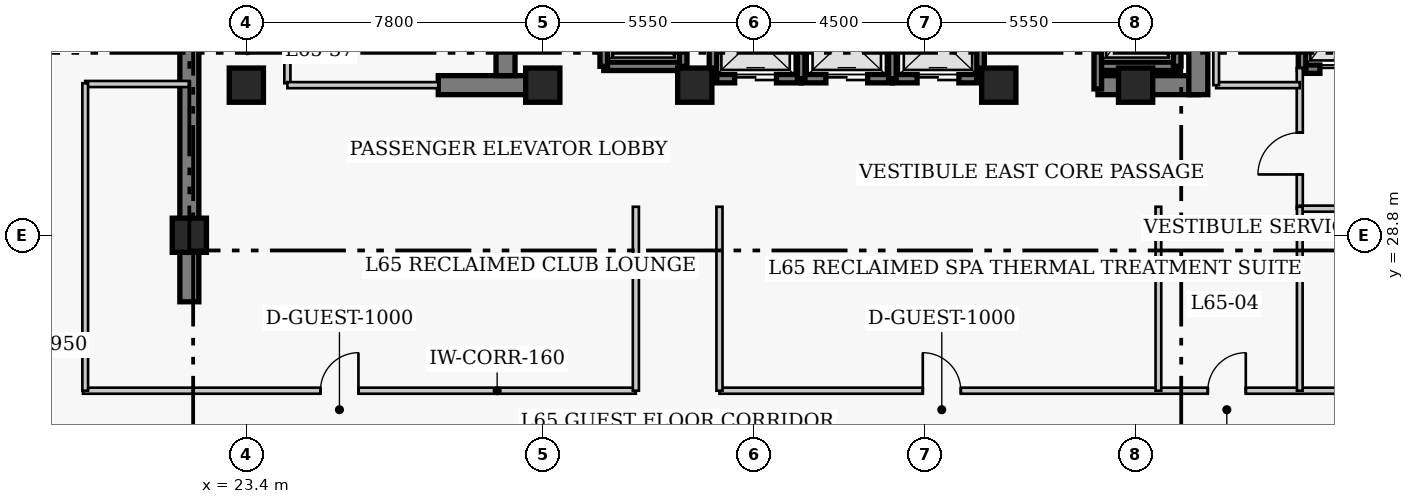
"""IFC4 building model, lengths in metres.
Left out: names, types, materials, properties, quantities, classifications, styles, units other than length and angle.
Written with IfcOpenShell. Run it as: python <this file> out.ifc"""

import sys

from ifc_helpers import new_model, si_unit, direction, frame, frame_2d, origin, origin_2d, place, context, subcontext, project, spatial, rectangle, extrude, element, fill, save


model = new_model("IFC4")
c1 = context("Model", 3, precision=1e-05, world=origin(), true_north=direction((0.0, 1.0)))
c2 = subcontext(c1, "Body", "Model", "MODEL_VIEW")
j1 = project(units=[si_unit("LENGTHUNIT", "METRE"), si_unit("PLANEANGLEUNIT", "RADIAN")], contexts=[c1])
p1 = place(None, origin())
s1 = spatial("IfcSite", under=j1, at=p1, CompositionType="ELEMENT")
p2 = place(p1, origin())
s2 = spatial("IfcBuilding", under=s1, at=p2, CompositionType="ELEMENT")
p3 = place(p2, frame((0.0, 0.0, 261.4)))
s3 = spatial("IfcBuildingStorey", under=s2, at=p3, CompositionType="ELEMENT", Elevation=261.4)
p4 = place(p3, frame((21.9, 27.05, 0.0), z_axis=(0.0, 0.0, 1.0), x_axis=(0.0, 1.0, 0.0)))
e1 = element("IfcWall", 1, at=p4, inside=s3, PredefinedType="SHEAR", context=c2, shape_type="SweptSolid", body=[
    extrude(rectangle(XDim=13.52, YDim=0.5, at=frame_2d((6.76, 0.0))), origin(), (0.0, 0.0, 1.0), 4.0),
])
p5 = place(p3, frame((28.45, 32.75, 0.0), z_axis=(0.0, 0.0, 1.0), x_axis=(1.0, 0.0, 0.0)))
e2 = element("IfcWall", 2, at=p5, inside=s3, PredefinedType="SHEAR", context=c2, shape_type="SweptSolid", body=[
    extrude(rectangle(XDim=2.4, YDim=0.5, at=frame_2d((1.2, 0.0))), origin(), (0.0, 0.0, 1.0), 4.0),
])
p6 = place(p3, frame((45.81, 32.75, 0.0), z_axis=(0.0, 0.0, 1.0), x_axis=(1.0, 0.0, 0.0)))
e3 = element("IfcWall", 3, at=p6, inside=s3, PredefinedType="SHEAR", context=c2, shape_type="SweptSolid", body=[
    extrude(rectangle(XDim=2.64, YDim=0.5, at=frame_2d((1.32, 0.0))), origin(), (0.0, 0.0, 1.0), 4.0),
])
p7 = place(p3, frame((30.22, 33.0, 0.0), z_axis=(0.0, 0.0, 1.0), x_axis=(0.0, 1.0, 0.0)))
e4 = element("IfcWall", 4, at=p7, inside=s3, PredefinedType="SHEAR", context=c2, shape_type="SweptSolid", body=[
    extrude(rectangle(XDim=7.32, YDim=0.5, at=frame_2d((3.66, 0.0))), origin(), (0.0, 0.0, 1.0), 4.0),
])
p8 = place(p3, frame((48.45, 32.5, 0.0), z_axis=(0.0, 0.0, 1.0), x_axis=(0.0, 1.0, 0.0)))
e5 = element("IfcWall", 5, at=p8, inside=s3, PredefinedType="SHEAR", context=c2, shape_type="SweptSolid", body=[
    extrude(rectangle(XDim=7.82, YDim=0.5, at=frame_2d((3.91, 0.0))), origin(), (0.0, 0.0, 1.0), 4.0),
])
p9 = place(p8, frame((5.7, 0.0, 0.0)))
e6 = element("IfcOpeningElement", 6, at=p9, cuts=e5, PredefinedType="OPENING", context=c2, shape_type="SweptSolid", body=[
    extrude(rectangle(XDim=1.1, YDim=2.15, at=frame_2d((0.55, 1.075))), frame((0.0, 0.26, 0.0), z_axis=(0.0, -1.0, 0.0), x_axis=(1.0, 0.0, 0.0)), (0.0, 0.0, 1.0), 0.52),
])
for number, where, z_axis, x_axis in (
    (7, (21.9, 28.8, 0.0), (0.0, 0.0, 1.0), (1.0, 0.0, 0.0)),
    (8, (23.4, 32.75, 0.0), (0.0, 0.0, 1.0), (1.0, 0.0, 0.0)),
    (9, (31.2, 32.75, 0.0), (0.0, 0.0, 1.0), (1.0, 0.0, 0.0)),
    (10, (35.2, 32.75, 0.0), (0.0, 0.0, 1.0), (1.0, 0.0, 0.0)),
    (11, (43.2, 32.75, 0.0), (0.0, 0.0, 1.0), (1.0, 0.0, 0.0)),
    (12, (46.8, 32.75, 0.0), (0.0, 0.0, 1.0), (1.0, 0.0, 0.0)),
):
    element("IfcColumn", number, at=place(p3, frame(where, z_axis=z_axis, x_axis=x_axis)), inside=s3, PredefinedType="COLUMN", context=c2, shape_type="SweptSolid", body=[
        extrude(rectangle(XDim=0.9, YDim=0.9, at=origin_2d()), origin(), (0.0, 0.0, 1.0), 4.0),
    ])
p10 = place(p3, frame((35.68, 32.92, 0.0), z_axis=(0.0, 0.0, 1.0), x_axis=(1.0, 0.0, 0.0)))
e13 = element("IfcWall", 13, at=p10, inside=s3, PredefinedType="SHEAR", context=c2, shape_type="SweptSolid", body=[
    extrude(rectangle(XDim=2.32, YDim=0.22, at=frame_2d((1.16, 0.0))), origin(), (0.0, 0.0, 1.0), 4.0),
])
p11 = place(p10, frame((0.57, 0.0, 0.0)))
e14 = element("IfcOpeningElement", 14, at=p11, cuts=e13, PredefinedType="OPENING", context=c2, shape_type="SweptSolid", body=[
    extrude(rectangle(XDim=1.1, YDim=2.15, at=frame_2d((0.55, 1.075))), frame((0.0, 0.12, 0.0), z_axis=(0.0, -1.0, 0.0), x_axis=(1.0, 0.0, 0.0)), (0.0, 0.0, 1.0), 0.24),
])
p12 = place(p3, frame((35.68, 32.92, 0.0), z_axis=(0.0, 0.0, 1.0), x_axis=(0.0, 1.0, 0.0)))
e15 = element("IfcWall", 15, at=p12, inside=s3, PredefinedType="SHEAR", context=c2, shape_type="SweptSolid", body=[
    extrude(rectangle(XDim=2.16, YDim=0.2, at=frame_2d((1.08, 0.0))), origin(), (0.0, 0.0, 1.0), 4.0),
])
p13 = place(p3, frame((38.0, 32.92, 0.0), z_axis=(0.0, 0.0, 1.0), x_axis=(1.0, 0.0, 0.0)))
e16 = element("IfcWall", 16, at=p13, inside=s3, PredefinedType="SHEAR", context=c2, shape_type="SweptSolid", body=[
    extrude(rectangle(XDim=2.4, YDim=0.22, at=frame_2d((1.2, 0.0))), origin(), (0.0, 0.0, 1.0), 4.0),
])
p14 = place(p13, frame((0.65, 0.0, 0.0)))
e17 = element("IfcOpeningElement", 17, at=p14, cuts=e16, PredefinedType="OPENING", context=c2, shape_type="SweptSolid", body=[
    extrude(rectangle(XDim=1.1, YDim=2.15, at=frame_2d((0.55, 1.075))), frame((0.0, 0.12, 0.0), z_axis=(0.0, -1.0, 0.0), x_axis=(1.0, 0.0, 0.0)), (0.0, 0.0, 1.0), 0.24),
])
p15 = place(p3, frame((38.0, 32.92, 0.0), z_axis=(0.0, 0.0, 1.0), x_axis=(0.0, 1.0, 0.0)))
e18 = element("IfcWall", 18, at=p15, inside=s3, PredefinedType="SHEAR", context=c2, shape_type="SweptSolid", body=[
    extrude(rectangle(XDim=2.16, YDim=0.2, at=frame_2d((1.08, 0.0))), origin(), (0.0, 0.0, 1.0), 4.0),
])
p16 = place(p3, frame((40.4, 32.92, 0.0), z_axis=(0.0, 0.0, 1.0), x_axis=(1.0, 0.0, 0.0)))
e19 = element("IfcWall", 19, at=p16, inside=s3, PredefinedType="SHEAR", context=c2, shape_type="SweptSolid", body=[
    extrude(rectangle(XDim=2.32, YDim=0.22, at=frame_2d((1.16, 0.0))), origin(), (0.0, 0.0, 1.0), 4.0),
])
p17 = place(p16, frame((0.65, 0.0, 0.0)))
e20 = element("IfcOpeningElement", 20, at=p17, cuts=e19, PredefinedType="OPENING", context=c2, shape_type="SweptSolid", body=[
    extrude(rectangle(XDim=1.1, YDim=2.15, at=frame_2d((0.55, 1.075))), frame((0.0, 0.12, 0.0), z_axis=(0.0, -1.0, 0.0), x_axis=(1.0, 0.0, 0.0)), (0.0, 0.0, 1.0), 0.24),
])
for number, where, z_axis, x_axis in (
    (21, (40.4, 32.92, 0.0), (0.0, 0.0, 1.0), (0.0, 1.0, 0.0)),
    (22, (42.72, 32.92, 0.0), (0.0, 0.0, 1.0), (0.0, 1.0, 0.0)),
):
    element("IfcWall", number, at=place(p3, frame(where, z_axis=z_axis, x_axis=x_axis)), inside=s3, PredefinedType="SHEAR", context=c2, shape_type="SweptSolid", body=[
        extrude(rectangle(XDim=2.16, YDim=0.2, at=frame_2d((1.08, 0.0))), origin(), (0.0, 0.0, 1.0), 4.0),
    ])
p18 = place(p3, frame((51.18, 33.17, 0.0), z_axis=(0.0, 0.0, 1.0), x_axis=(1.0, 0.0, 0.0)))
e23 = element("IfcWall", 23, at=p18, inside=s3, PredefinedType="SHEAR", context=c2, shape_type="SweptSolid", body=[
    extrude(rectangle(XDim=2.42, YDim=0.22, at=frame_2d((1.21, 0.0))), origin(), (0.0, 0.0, 1.0), 4.0),
])
p19 = place(p18, frame((0.47, 0.0, 0.0)))
e24 = element("IfcOpeningElement", 24, at=p19, cuts=e23, PredefinedType="OPENING", context=c2, shape_type="SweptSolid", body=[
    extrude(rectangle(XDim=1.3, YDim=2.15, at=frame_2d((0.65, 1.075))), frame((0.0, 0.12, 0.0), z_axis=(0.0, -1.0, 0.0), x_axis=(1.0, 0.0, 0.0)), (0.0, 0.0, 1.0), 0.24),
])
p20 = place(p3, frame((51.18, 33.17, 0.0), z_axis=(0.0, 0.0, 1.0), x_axis=(0.0, 1.0, 0.0)))
e25 = element("IfcWall", 25, at=p20, inside=s3, PredefinedType="SHEAR", context=c2, shape_type="SweptSolid", body=[
    extrude(rectangle(XDim=2.86, YDim=0.2, at=frame_2d((1.43, 0.0))), origin(), (0.0, 0.0, 1.0), 4.0),
])
p21 = place(p3, frame((32.805, 33.245, 0.0), z_axis=(0.0, 0.0, 1.0), x_axis=(1.0, 0.0, 0.0)))
e26 = element("IfcWall", 26, at=p21, inside=s3, PredefinedType="SHEAR", context=c2, shape_type="SweptSolid", body=[
    extrude(rectangle(XDim=2.09, YDim=0.22, at=frame_2d((1.045, 0.0))), origin(), (0.0, 0.0, 1.0), 4.0),
])
for number, where, z_axis, x_axis in (
    (27, (32.805, 33.245, 0.0), (0.0, 0.0, 1.0), (0.0, 1.0, 0.0)),
    (28, (34.895, 33.245, 0.0), (0.0, 0.0, 1.0), (0.0, 1.0, 0.0)),
):
    element("IfcWall", number, at=place(p3, frame(where, z_axis=z_axis, x_axis=x_axis)), inside=s3, PredefinedType="SHEAR", context=c2, shape_type="SweptSolid", body=[
        extrude(rectangle(XDim=2.91, YDim=0.2, at=frame_2d((1.455, 0.0))), origin(), (0.0, 0.0, 1.0), 4.0),
    ])
p22 = place(p3, frame((45.805, 33.245, 0.0), z_axis=(0.0, 0.0, 1.0), x_axis=(1.0, 0.0, 0.0)))
e29 = element("IfcWall", 29, at=p22, inside=s3, PredefinedType="SHEAR", context=c2, shape_type="SweptSolid", body=[
    extrude(rectangle(XDim=2.09, YDim=0.22, at=frame_2d((1.045, 0.0))), origin(), (0.0, 0.0, 1.0), 4.0),
])
p23 = place(p3, frame((45.805, 32.65, 0.0), z_axis=(0.0, 0.0, 1.0), x_axis=(0.0, 1.0, 0.0)))
e30 = element("IfcWall", 30, at=p23, inside=s3, PredefinedType="SHEAR", context=c2, shape_type="SweptSolid", body=[
    extrude(rectangle(XDim=3.505, YDim=0.2, at=frame_2d((1.752, 0.0))), origin(), (0.0, 0.0, 1.0), 4.0),
])
p24 = place(p3, frame((47.895, 33.245, 0.0), z_axis=(0.0, 0.0, 1.0), x_axis=(0.0, 1.0, 0.0)))
e31 = element("IfcWall", 31, at=p24, inside=s3, PredefinedType="SHEAR", context=c2, shape_type="SweptSolid", body=[
    extrude(rectangle(XDim=2.91, YDim=0.2, at=frame_2d((1.455, 0.0))), origin(), (0.0, 0.0, 1.0), 4.0),
])
p25 = place(p3, frame((24.48, 32.8, 0.0), z_axis=(0.0, 0.0, 1.0), x_axis=(0.0, 1.0, 0.0)))
e32 = element("IfcWall", 32, at=p25, inside=s3, PredefinedType="PARTITIONING", context=c2, shape_type="SweptSolid", body=[
    extrude(rectangle(XDim=3.57, YDim=0.16, at=frame_2d((1.785, 0.0))), origin(), (0.0, 0.0, 1.0), 3.76),
])
p26 = place(p25, frame((1.604, 0.0, 0.0)))
e33 = element("IfcOpeningElement", 33, at=p26, cuts=e32, PredefinedType="OPENING", context=c2, shape_type="SweptSolid", body=[
    extrude(rectangle(XDim=0.9, YDim=2.1, at=frame_2d((0.45, 1.05))), frame((0.0, 0.09, 0.0), z_axis=(0.0, -1.0, 0.0), x_axis=(1.0, 0.0, 0.0)), (0.0, 0.0, 1.0), 0.18),
])
p27 = place(p3, frame((51.12, 29.5, 0.0), z_axis=(0.0, 0.0, 1.0), x_axis=(0.0, 1.0, 0.0)))
e34 = element("IfcWall", 34, at=p27, inside=s3, PredefinedType="PARTITIONING", context=c2, shape_type="SweptSolid", body=[
    extrude(rectangle(XDim=3.7, YDim=0.16, at=frame_2d((1.85, 0.0))), origin(), (0.0, 0.0, 1.0), 3.76),
])
p28 = place(p27, frame((0.9, 0.0, 0.0)))
e35 = element("IfcOpeningElement", 35, at=p28, cuts=e34, PredefinedType="OPENING", context=c2, shape_type="SweptSolid", body=[
    extrude(rectangle(XDim=1.1, YDim=2.15, at=frame_2d((0.55, 1.075))), frame((0.0, 0.09, 0.0), z_axis=(0.0, -1.0, 0.0), x_axis=(1.0, 0.0, 0.0)), (0.0, 0.0, 1.0), 0.18),
])
p29 = place(p3, frame((51.12, 29.5, 0.0), z_axis=(0.0, 0.0, 1.0), x_axis=(1.0, 0.0, 0.0)))
e36 = element("IfcWall", 36, at=p29, inside=s3, PredefinedType="PARTITIONING", context=c2, shape_type="SweptSolid", body=[
    extrude(rectangle(XDim=5.63, YDim=0.16, at=frame_2d((2.815, 0.0))), origin(), (0.0, 0.0, 1.0), 3.76),
])
p30 = place(p3, frame((24.48, 32.75, 0.0), z_axis=(0.0, 0.0, 1.0), x_axis=(1.0, 0.0, 0.0)))
e37 = element("IfcWall", 37, at=p30, inside=s3, PredefinedType="PARTITIONING", context=c2, shape_type="SweptSolid", body=[
    extrude(rectangle(XDim=3.97, YDim=0.16, at=frame_2d((1.985, 0.0))), origin(), (0.0, 0.0, 1.0), 3.76),
])
p31 = place(p3, frame((48.92, 32.75, 0.0), z_axis=(0.0, 0.0, 1.0), x_axis=(1.0, 0.0, 0.0)))
e38 = element("IfcWall", 38, at=p31, inside=s3, PredefinedType="PARTITIONING", context=c2, shape_type="SweptSolid", body=[
    extrude(rectangle(XDim=2.2, YDim=0.16, at=frame_2d((1.1, 0.0))), origin(), (0.0, 0.0, 1.0), 3.76),
])
p32 = place(p3, frame((48.92, 32.75, 0.0), z_axis=(0.0, 0.0, 1.0), x_axis=(0.0, 1.0, 0.0)))
e39 = element("IfcWall", 39, at=p32, inside=s3, PredefinedType="PARTITIONING", context=c2, shape_type="SweptSolid", body=[
    extrude(rectangle(XDim=3.62, YDim=0.15, at=frame_2d((1.81, 0.0))), origin(), (0.0, 0.0, 1.0), 3.76),
])
p33 = place(p3, frame((19.1, 24.71, 0.0), z_axis=(0.0, 0.0, 1.0), x_axis=(1.0, 0.0, 0.0)))
e40 = element("IfcWall", 40, at=p33, inside=s3, PredefinedType="PARTITIONING", context=c2, shape_type="SweptSolid", body=[
    extrude(rectangle(XDim=14.55, YDim=0.16, at=frame_2d((7.275, 0.0))), origin(), (0.0, 0.0, 1.0), 3.76),
])
p34 = place(p33, frame((6.25, 0.0, 0.0)))
e41 = element("IfcOpeningElement", 41, at=p34, cuts=e40, PredefinedType="OPENING", context=c2, shape_type="SweptSolid", body=[
    extrude(rectangle(XDim=1.0, YDim=2.15, at=frame_2d((0.5, 1.075))), frame((0.0, 0.09, 0.0), z_axis=(0.0, -1.0, 0.0), x_axis=(1.0, 0.0, 0.0)), (0.0, 0.0, 1.0), 0.18),
])
p35 = place(p3, frame((35.85, 24.71, 0.0), z_axis=(0.0, 0.0, 1.0), x_axis=(1.0, 0.0, 0.0)))
e42 = element("IfcWall", 42, at=p35, inside=s3, PredefinedType="PARTITIONING", context=c2, shape_type="SweptSolid", body=[
    extrude(rectangle(XDim=23.0, YDim=0.16, at=frame_2d((11.5, 0.0))), origin(), (0.0, 0.0, 1.0), 3.76),
])
p36 = place(p35, frame((5.35, 0.0, 0.0)))
e43 = element("IfcOpeningElement", 43, at=p36, cuts=e42, PredefinedType="OPENING", context=c2, shape_type="SweptSolid", body=[
    extrude(rectangle(XDim=1.0, YDim=2.15, at=frame_2d((0.5, 1.075))), frame((0.0, 0.09, 0.0), z_axis=(0.0, -1.0, 0.0), x_axis=(1.0, 0.0, 0.0)), (0.0, 0.0, 1.0), 0.18),
])
p37 = place(p35, frame((12.85, 0.0, 0.0)))
e44 = element("IfcOpeningElement", 44, at=p37, cuts=e42, PredefinedType="OPENING", context=c2, shape_type="SweptSolid", body=[
    extrude(rectangle(XDim=1.0, YDim=2.15, at=frame_2d((0.5, 1.075))), frame((0.0, 0.09, 0.0), z_axis=(0.0, -1.0, 0.0), x_axis=(1.0, 0.0, 0.0)), (0.0, 0.0, 1.0), 0.18),
])
for number, where, z_axis, x_axis in (
    (45, (33.65, 24.71, 0.0), (0.0, 0.0, 1.0), (0.0, 1.0, 0.0)),
    (46, (35.85, 24.71, 0.0), (0.0, 0.0, 1.0), (0.0, 1.0, 0.0)),
):
    element("IfcWall", number, at=place(p3, frame(where, z_axis=z_axis, x_axis=x_axis)), inside=s3, PredefinedType="PARTITIONING", context=c2, shape_type="SweptSolid", body=[
        extrude(rectangle(XDim=4.84, YDim=0.16, at=frame_2d((2.42, 0.0))), origin(), (0.0, 0.0, 1.0), 3.76),
    ])
p38 = place(p3, frame((19.16, 32.78, 0.0), z_axis=(0.0, 0.0, 1.0), x_axis=(1.0, 0.0, 0.0)))
e47 = element("IfcWall", 47, at=p38, inside=s3, PredefinedType="PARTITIONING", context=c2, shape_type="SweptSolid", body=[
    extrude(rectangle(XDim=2.74, YDim=0.16, at=frame_2d((1.37, 0.0))), origin(), (0.0, 0.0, 1.0), 3.76),
])
p39 = place(p3, frame((19.16, 24.71, 0.0), z_axis=(0.0, 0.0, 1.0), x_axis=(0.0, 1.0, 0.0)))
e48 = element("IfcWall", 48, at=p39, inside=s3, PredefinedType="PARTITIONING", context=c2, shape_type="SweptSolid", body=[
    extrude(rectangle(XDim=8.09, YDim=0.15, at=frame_2d((4.045, 0.0))), origin(), (0.0, 0.0, 1.0), 3.76),
])
for number, where, z_axis, x_axis in (
    (49, (47.4, 24.71, 0.0), (0.0, 0.0, 1.0), (0.0, 1.0, 0.0)),
    (50, (51.12, 24.71, 0.0), (0.0, 0.0, 1.0), (0.0, 1.0, 0.0)),
):
    element("IfcWall", number, at=place(p3, frame(where, z_axis=z_axis, x_axis=x_axis)), inside=s3, PredefinedType="PARTITIONING", context=c2, shape_type="SweptSolid", body=[
        extrude(rectangle(XDim=4.84, YDim=0.15, at=frame_2d((2.42, 0.0))), origin(), (0.0, 0.0, 1.0), 3.76),
    ])
p40 = place(p11, origin())
e51 = element("IfcDoor", 51, at=p40, inside=s3, OperationType="DOUBLE_DOOR_SLIDING", PredefinedType="DOOR", context=c2, shape_type="SweptSolid", body=[
    extrude(rectangle(XDim=1.1, YDim=2.15, at=frame_2d((0.55, 1.075))), frame((0.0, 0.025, 0.0), z_axis=(0.0, -1.0, 0.0), x_axis=(1.0, 0.0, 0.0)), (0.0, 0.0, 1.0), 0.05),
])
fill(e14, e51)
p41 = place(p14, origin())
e52 = element("IfcDoor", 52, at=p41, inside=s3, OperationType="DOUBLE_DOOR_SLIDING", PredefinedType="DOOR", context=c2, shape_type="SweptSolid", body=[
    extrude(rectangle(XDim=1.1, YDim=2.15, at=frame_2d((0.55, 1.075))), frame((0.0, 0.025, 0.0), z_axis=(0.0, -1.0, 0.0), x_axis=(1.0, 0.0, 0.0)), (0.0, 0.0, 1.0), 0.05),
])
fill(e17, e52)
p42 = place(p17, origin())
e53 = element("IfcDoor", 53, at=p42, inside=s3, OperationType="DOUBLE_DOOR_SLIDING", PredefinedType="DOOR", context=c2, shape_type="SweptSolid", body=[
    extrude(rectangle(XDim=1.1, YDim=2.15, at=frame_2d((0.55, 1.075))), frame((0.0, 0.025, 0.0), z_axis=(0.0, -1.0, 0.0), x_axis=(1.0, 0.0, 0.0)), (0.0, 0.0, 1.0), 0.05),
])
fill(e20, e53)
p43 = place(p19, origin())
e54 = element("IfcDoor", 54, at=p43, inside=s3, OperationType="DOUBLE_DOOR_SLIDING", PredefinedType="DOOR", context=c2, shape_type="SweptSolid", body=[
    extrude(rectangle(XDim=1.3, YDim=2.15, at=frame_2d((0.65, 1.075))), frame((0.0, 0.025, 0.0), z_axis=(0.0, -1.0, 0.0), x_axis=(1.0, 0.0, 0.0)), (0.0, 0.0, 1.0), 0.05),
])
fill(e24, e54)
p44 = place(p28, origin())
e55 = element("IfcDoor", 55, at=p44, inside=s3, OperationType="SINGLE_SWING_LEFT", PredefinedType="DOOR", context=c2, shape_type="SweptSolid", body=[
    extrude(rectangle(XDim=1.1, YDim=2.15, at=frame_2d((0.55, 1.075))), frame((0.0, 0.025, 0.0), z_axis=(0.0, -1.0, 0.0), x_axis=(1.0, 0.0, 0.0)), (0.0, 0.0, 1.0), 0.05),
])
fill(e35, e55)
p45 = place(p34, origin())
e56 = element("IfcDoor", 56, at=p45, inside=s3, OperationType="SINGLE_SWING_RIGHT", PredefinedType="DOOR", context=c2, shape_type="SweptSolid", body=[
    extrude(rectangle(XDim=1.0, YDim=2.15, at=frame_2d((0.5, 1.075))), frame((0.0, 0.025, 0.0), z_axis=(0.0, -1.0, 0.0), x_axis=(1.0, 0.0, 0.0)), (0.0, 0.0, 1.0), 0.05),
])
fill(e41, e56)
p46 = place(p36, origin())
e57 = element("IfcDoor", 57, at=p46, inside=s3, OperationType="SINGLE_SWING_LEFT", PredefinedType="DOOR", context=c2, shape_type="SweptSolid", body=[
    extrude(rectangle(XDim=1.0, YDim=2.15, at=frame_2d((0.5, 1.075))), frame((0.0, 0.025, 0.0), z_axis=(0.0, -1.0, 0.0), x_axis=(1.0, 0.0, 0.0)), (0.0, 0.0, 1.0), 0.05),
])
fill(e43, e57)
p47 = place(p37, origin())
e58 = element("IfcDoor", 58, at=p47, inside=s3, OperationType="SINGLE_SWING_RIGHT", PredefinedType="DOOR", context=c2, shape_type="SweptSolid", body=[
    extrude(rectangle(XDim=1.0, YDim=2.15, at=frame_2d((0.5, 1.075))), frame((0.0, 0.025, 0.0), z_axis=(0.0, -1.0, 0.0), x_axis=(1.0, 0.0, 0.0)), (0.0, 0.0, 1.0), 0.05),
])
fill(e44, e58)
save(model, sys.argv[1])
